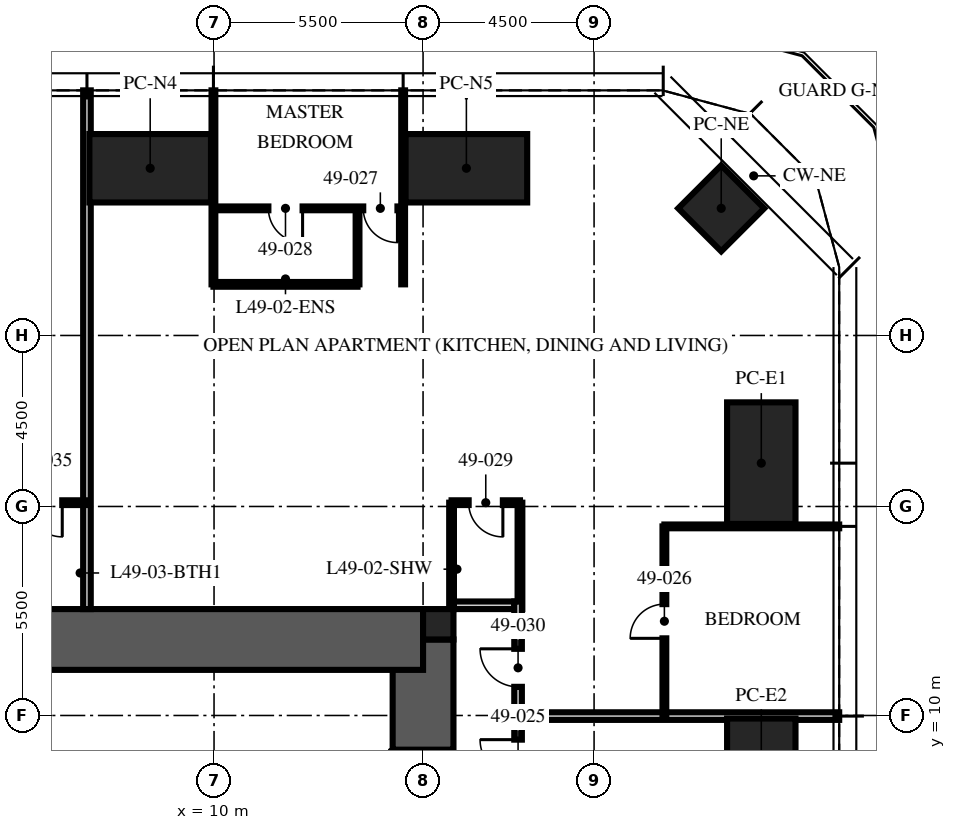
"""IFC4 building model, lengths in metres.
Left out: names, types, materials, properties, quantities, classifications, styles, units other than length and angle.
Written with IfcOpenShell. Run it as: python <this file> out.ifc"""

import sys

from ifc_helpers import new_model, si_unit, direction, frame, frame_2d, origin, origin_2d, place, context, subcontext, project, spatial, rectangle, hollow_rectangle, extrude, element, fill, save


model = new_model("IFC4")
c1 = context("Model", 3, precision=1e-05, world=origin(), true_north=direction((0.0, 1.0)))
c2 = subcontext(c1, "Body", "Model", "MODEL_VIEW")
j1 = project(units=[si_unit("LENGTHUNIT", "METRE"), si_unit("PLANEANGLEUNIT", "RADIAN")], contexts=[c1])
p1 = place(None, origin())
s1 = spatial("IfcSite", under=j1, at=p1, CompositionType="ELEMENT")
p2 = place(p1, origin())
s2 = spatial("IfcBuilding", under=s1, at=p2, CompositionType="ELEMENT")
p3 = place(p2, frame((0.0, 0.0, 199.5)))
s3 = spatial("IfcBuildingStorey", under=s2, at=p3, CompositionType="ELEMENT", Elevation=199.5)
p4 = place(p3, frame((15.5, -12.0, -0.25), z_axis=(0.0, 0.0, 1.0), x_axis=(0.0, 1.0, 0.0)))
e1 = element("IfcWall", 1, at=p4, inside=s3, PredefinedType="SHEAR", context=c2, shape_type="SweptSolid", body=[
    extrude(rectangle(XDim=24.0, YDim=1.6, at=frame_2d((12.0, 0.0))), origin(), (0.0, 0.0, 1.0), 3.75),
])
p5 = place(p4, frame((3.2, 0.0, 0.25)))
e2 = element("IfcOpeningElement", 2, at=p5, cuts=e1, PredefinedType="OPENING", context=c2, shape_type="SweptSolid", body=[
    extrude(rectangle(XDim=1.2, YDim=2.1, at=frame_2d((0.6, 1.05))), frame((0.0, 0.81, 0.0), z_axis=(0.0, -1.0, 0.0), x_axis=(1.0, 0.0, 0.0)), (0.0, 0.0, 1.0), 1.62),
])
p6 = place(p4, frame((19.3, 0.0, 0.25)))
e3 = element("IfcOpeningElement", 3, at=p6, cuts=e1, PredefinedType="OPENING", context=c2, shape_type="SweptSolid", body=[
    extrude(rectangle(XDim=1.8, YDim=2.1, at=frame_2d((0.9, 1.05))), frame((0.0, 0.81, 0.0), z_axis=(0.0, -1.0, 0.0), x_axis=(1.0, 0.0, 0.0)), (0.0, 0.0, 1.0), 1.62),
])
p7 = place(p3, frame((-15.5, 12.0, -0.25), z_axis=(0.0, 0.0, 1.0), x_axis=(1.0, 0.0, 0.0)))
e4 = element("IfcWall", 4, at=p7, inside=s3, PredefinedType="SHEAR", context=c2, shape_type="SweptSolid", body=[
    extrude(rectangle(XDim=31.0, YDim=1.6, at=frame_2d((15.5, 0.0))), origin(), (0.0, 0.0, 1.0), 3.75),
])
p8 = place(p3, frame((15.9, 12.4, -0.25), z_axis=(0.0, 0.0, 1.0), x_axis=(1.0, 0.0, 0.0)))
e5 = element("IfcColumn", 5, at=p8, inside=s3, PredefinedType="COLUMN", context=c2, shape_type="SweptSolid", body=[
    extrude(rectangle(XDim=0.8, YDim=0.8, at=origin_2d()), origin(), (0.0, 0.0, 1.0), 3.75),
])
p9 = place(p3, frame((8.32, 24.4, -0.07), z_axis=(0.0, 0.0, 1.0), x_axis=(1.0, 0.0, 0.0)))
e6 = element("IfcColumn", 6, at=p9, inside=s3, PredefinedType="COLUMN", context=c2, shape_type="SweptSolid", body=[
    extrude(hollow_rectangle(XDim=3.2, YDim=1.8, WallThickness=0.2, at=origin_2d()), origin(), (0.0, 0.0, 1.0), 3.82),
])
for number, where, z_axis, x_axis in (
    (7, (16.64, 24.4, 0.08), (0.0, 0.0, 1.0), (1.0, 0.0, 0.0)),
    (8, (24.4, 16.64, 0.08), (0.0, 0.0, 1.0), (0.0, 1.0, 0.0)),
):
    element("IfcColumn", number, at=place(p3, frame(where, z_axis=z_axis, x_axis=x_axis)), inside=s3, PredefinedType="COLUMN", context=c2, shape_type="SweptSolid", body=[
        extrude(hollow_rectangle(XDim=3.2, YDim=1.8, WallThickness=0.2, at=origin_2d()), origin(), (0.0, 0.0, 1.0), 3.67),
    ])
p10 = place(p3, frame((24.4, 8.32, -0.07), z_axis=(0.0, 0.0, 1.0), x_axis=(0.0, 1.0, 0.0)))
e9 = element("IfcColumn", 9, at=p10, inside=s3, PredefinedType="COLUMN", context=c2, shape_type="SweptSolid", body=[
    extrude(hollow_rectangle(XDim=3.2, YDim=1.8, WallThickness=0.2, at=origin_2d()), origin(), (0.0, 0.0, 1.0), 3.82),
])
p11 = place(p3, frame((23.346, 23.346, -0.19), z_axis=(0.0, 0.0, 1.0), x_axis=(0.707106781187, -0.707106781187, 0.0)))
e10 = element("IfcColumn", 10, at=p11, inside=s3, PredefinedType="COLUMN", context=c2, shape_type="SweptSolid", body=[
    extrude(hollow_rectangle(XDim=1.6, YDim=1.6, WallThickness=0.1, at=origin_2d()), origin(), (0.0, 0.0, 1.0), 3.94),
])
p12 = place(p3, frame((16.3, 12.9, 0.0), z_axis=(0.0, 0.0, 1.0), x_axis=(1.0, 0.0, 0.0)))
e11 = element("IfcWall", 11, at=p12, inside=s3, PredefinedType="PARTITIONING", context=c2, shape_type="SweptSolid", body=[
    extrude(rectangle(XDim=1.6, YDim=0.2, at=frame_2d((0.8, 0.0))), origin(), (0.0, 0.0, 1.0), 2.3),
])
p13 = place(p3, frame((18.1, 9.984, 0.0), z_axis=(0.0, 0.0, 1.0), x_axis=(1.0, 0.0, 0.0)))
e12 = element("IfcWall", 12, at=p13, inside=s3, PredefinedType="PARTITIONING", context=c2, shape_type="SweptSolid", body=[
    extrude(rectangle(XDim=8.35, YDim=0.2, at=frame_2d((4.175, 0.0))), origin(), (0.0, 0.0, 1.0), 2.91),
])
p14 = place(p3, frame((21.85, 14.976, 0.0), z_axis=(0.0, 0.0, 1.0), x_axis=(1.0, 0.0, 0.0)))
e13 = element("IfcWall", 13, at=p14, inside=s3, PredefinedType="PARTITIONING", context=c2, shape_type="SweptSolid", body=[
    extrude(rectangle(XDim=4.6, YDim=0.1, at=frame_2d((2.3, 0.0))), origin(), (0.0, 0.0, 1.0), 2.91),
])
for number, where, z_axis, x_axis in (
    (14, (14.976, 21.345, 0.0), (0.0, 0.0, 1.0), (0.0, 1.0, 0.0)),
    (15, (9.984, 21.345, 0.0), (0.0, 0.0, 1.0), (0.0, 1.0, 0.0)),
):
    element("IfcWall", number, at=place(p3, frame(where, z_axis=z_axis, x_axis=x_axis)), inside=s3, PredefinedType="PARTITIONING", context=c2, shape_type="SweptSolid", body=[
        extrude(rectangle(XDim=5.105, YDim=0.1, at=frame_2d((2.552, 0.0))), origin(), (0.0, 0.0, 1.0), 2.91),
    ])
p15 = place(p3, frame((6.656, 12.8, 0.0), z_axis=(0.0, 0.0, 1.0), x_axis=(0.0, 1.0, 0.0)))
e16 = element("IfcWall", 16, at=p15, inside=s3, PredefinedType="PARTITIONING", context=c2, shape_type="SweptSolid", body=[
    extrude(rectangle(XDim=13.65, YDim=0.2, at=frame_2d((6.825, 0.0))), origin(), (0.0, 0.0, 1.0), 2.91),
])
p16 = place(p3, frame((21.85, 9.984, 0.0), z_axis=(0.0, 0.0, 1.0), x_axis=(0.0, 1.0, 0.0)))
e17 = element("IfcWall", 17, at=p16, inside=s3, PredefinedType="PARTITIONING", context=c2, shape_type="SweptSolid", body=[
    extrude(rectangle(XDim=4.992, YDim=0.1, at=frame_2d((2.496, 0.0))), origin(), (0.0, 0.0, 1.0), 2.81),
])
p17 = place(p16, frame((2.046, 0.0, 0.0)))
e18 = element("IfcOpeningElement", 18, at=p17, cuts=e17, PredefinedType="OPENING", context=c2, shape_type="SweptSolid", body=[
    extrude(rectangle(XDim=0.9, YDim=2.1, at=frame_2d((0.45, 1.05))), frame((0.0, 0.06, 0.0), z_axis=(0.0, -1.0, 0.0), x_axis=(1.0, 0.0, 0.0)), (0.0, 0.0, 1.0), 0.12),
])
p18 = place(p3, frame((14.976, 23.345, 0.0), z_axis=(0.0, 0.0, 1.0), x_axis=(-1.0, 0.0, 0.0)))
e19 = element("IfcWall", 19, at=p18, inside=s3, PredefinedType="PARTITIONING", context=c2, shape_type="SweptSolid", body=[
    extrude(rectangle(XDim=4.992, YDim=0.1, at=frame_2d((2.496, 0.0))), origin(), (0.0, 0.0, 1.0), 2.81),
])
p19 = place(p18, frame((0.15, 0.0, 0.0)))
e20 = element("IfcOpeningElement", 20, at=p19, cuts=e19, PredefinedType="OPENING", context=c2, shape_type="SweptSolid", body=[
    extrude(rectangle(XDim=0.9, YDim=2.1, at=frame_2d((0.45, 1.05))), frame((0.0, 0.06, 0.0), z_axis=(0.0, -1.0, 0.0), x_axis=(1.0, 0.0, 0.0)), (0.0, 0.0, 1.0), 0.12),
])
p20 = place(p18, frame((2.646, 0.0, 0.0)))
e21 = element("IfcOpeningElement", 21, at=p20, cuts=e19, PredefinedType="OPENING", context=c2, shape_type="SweptSolid", body=[
    extrude(rectangle(XDim=0.9, YDim=2.1, at=frame_2d((0.45, 1.05))), frame((0.0, 0.06, 0.0), z_axis=(0.0, -1.0, 0.0), x_axis=(1.0, 0.0, 0.0)), (0.0, 0.0, 1.0), 0.12),
])
p21 = place(p3, frame((13.776, 21.345, 0.0), z_axis=(0.0, 0.0, 1.0), x_axis=(0.0, 1.0, 0.0)))
e22 = element("IfcWall", 22, at=p21, inside=s3, PredefinedType="PARTITIONING", context=c2, shape_type="SweptSolid", body=[
    extrude(rectangle(XDim=2.0, YDim=0.1, at=frame_2d((1.0, 0.0))), origin(), (0.0, 0.0, 1.0), 3.5),
])
p22 = place(p3, frame((13.776, 21.345, 0.0), z_axis=(0.0, 0.0, 1.0), x_axis=(-1.0, 0.0, 0.0)))
e23 = element("IfcWall", 23, at=p22, inside=s3, PredefinedType="PARTITIONING", context=c2, shape_type="SweptSolid", body=[
    extrude(rectangle(XDim=3.792, YDim=0.125, at=frame_2d((1.896, 0.0))), origin(), (0.0, 0.0, 1.0), 2.81),
])
p23 = place(p3, frame((18.05, 15.6, 0.0), z_axis=(0.0, 0.0, 1.0), x_axis=(-1.0, 0.0, 0.0)))
e24 = element("IfcWall", 24, at=p23, inside=s3, PredefinedType="PARTITIONING", context=c2, shape_type="SweptSolid", body=[
    extrude(rectangle(XDim=1.8, YDim=0.125, at=frame_2d((0.9, 0.0))), origin(), (0.0, 0.0, 1.0), 2.3),
])
p24 = place(p23, frame((0.45, 0.0, 0.0)))
e25 = element("IfcOpeningElement", 25, at=p24, cuts=e24, PredefinedType="OPENING", context=c2, shape_type="SweptSolid", body=[
    extrude(rectangle(XDim=0.9, YDim=2.1, at=frame_2d((0.45, 1.05))), frame((0.0, 0.073, 0.0), z_axis=(0.0, -1.0, 0.0), x_axis=(1.0, 0.0, 0.0)), (0.0, 0.0, 1.0), 0.145),
])
for number, where, z_axis, x_axis in (
    (26, (18.05, 12.8, 0.0), (0.0, 0.0, 1.0), (0.0, 1.0, 0.0)),
    (27, (16.25, 12.8, 0.0), (0.0, 0.0, 1.0), (0.0, 1.0, 0.0)),
):
    element("IfcWall", number, at=place(p3, frame(where, z_axis=z_axis, x_axis=x_axis)), inside=s3, PredefinedType="PARTITIONING", context=c2, shape_type="SweptSolid", body=[
        extrude(rectangle(XDim=2.8, YDim=0.125, at=frame_2d((1.4, 0.0))), origin(), (0.0, 0.0, 1.0), 2.3),
    ])
p25 = place(p3, frame((6.656, 15.6, 0.0), z_axis=(0.0, 0.0, 1.0), x_axis=(-1.0, 0.0, 0.0)))
e28 = element("IfcWall", 28, at=p25, inside=s3, PredefinedType="PARTITIONING", context=c2, shape_type="SweptSolid", body=[
    extrude(rectangle(XDim=2.2, YDim=0.125, at=frame_2d((1.1, 0.0))), origin(), (0.0, 0.0, 1.0), 3.5),
])
p26 = place(p25, frame((0.65, 0.0, 0.0)))
e29 = element("IfcOpeningElement", 29, at=p26, cuts=e28, PredefinedType="OPENING", context=c2, shape_type="SweptSolid", body=[
    extrude(rectangle(XDim=0.9, YDim=2.1, at=frame_2d((0.45, 1.05))), frame((0.0, 0.073, 0.0), z_axis=(0.0, -1.0, 0.0), x_axis=(1.0, 0.0, 0.0)), (0.0, 0.0, 1.0), 0.145),
])
p27 = place(p3, frame((18.0, -13.0, 0.0), z_axis=(0.0, 0.0, 1.0), x_axis=(0.0, 1.0, 0.0)))
e30 = element("IfcWall", 30, at=p27, inside=s3, PredefinedType="PARTITIONING", context=c2, shape_type="SweptSolid", body=[
    extrude(rectangle(XDim=26.0, YDim=0.2, at=frame_2d((13.0, 0.0))), origin(), (0.0, 0.0, 1.0), 2.6),
])
p28 = place(p27, frame((21.364, 0.0, 0.0)))
e31 = element("IfcOpeningElement", 31, at=p28, cuts=e30, PredefinedType="OPENING", context=c2, shape_type="SweptSolid", body=[
    extrude(rectangle(XDim=1.0, YDim=2.2, at=frame_2d((0.5, 1.1))), frame((0.0, 0.11, 0.0), z_axis=(0.0, -1.0, 0.0), x_axis=(1.0, 0.0, 0.0)), (0.0, 0.0, 1.0), 0.22),
])
p29 = place(p27, frame((23.754, 0.0, 0.0)))
e32 = element("IfcOpeningElement", 32, at=p29, cuts=e30, PredefinedType="OPENING", context=c2, shape_type="SweptSolid", body=[
    extrude(rectangle(XDim=1.0, YDim=2.2, at=frame_2d((0.5, 1.1))), frame((0.0, 0.11, 0.0), z_axis=(0.0, -1.0, 0.0), x_axis=(1.0, 0.0, 0.0)), (0.0, 0.0, 1.0), 0.22),
])
p30 = place(p27, frame((4.6, 0.0, 0.0)))
e33 = element("IfcOpeningElement", 33, at=p30, cuts=e30, PredefinedType="OPENING", context=c2, shape_type="SweptSolid", body=[
    extrude(rectangle(XDim=1.0, YDim=2.2, at=frame_2d((0.5, 1.1))), frame((0.0, 0.11, 0.0), z_axis=(0.0, -1.0, 0.0), x_axis=(1.0, 0.0, 0.0)), (0.0, 0.0, 1.0), 0.22),
])
p31 = place(p6, origin())
e34 = element("IfcDoor", 34, at=p31, inside=s3, OperationType="DOUBLE_DOOR_SINGLE_SWING", PredefinedType="DOOR", context=c2, shape_type="SweptSolid", body=[
    extrude(rectangle(XDim=1.8, YDim=2.1, at=frame_2d((0.9, 1.05))), frame((0.0, 0.025, 0.0), z_axis=(0.0, -1.0, 0.0), x_axis=(1.0, 0.0, 0.0)), (0.0, 0.0, 1.0), 0.05),
])
fill(e3, e34)
p32 = place(p28, origin())
e35 = element("IfcDoor", 35, at=p32, inside=s3, OperationType="SINGLE_SWING_RIGHT", PredefinedType="DOOR", context=c2, shape_type="SweptSolid", body=[
    extrude(rectangle(XDim=1.0, YDim=2.2, at=frame_2d((0.5, 1.1))), frame((0.0, 0.025, 0.0), z_axis=(0.0, -1.0, 0.0), x_axis=(1.0, 0.0, 0.0)), (0.0, 0.0, 1.0), 0.05),
])
fill(e31, e35)
p33 = place(p17, origin())
e36 = element("IfcDoor", 36, at=p33, inside=s3, OperationType="SINGLE_SWING_LEFT", PredefinedType="DOOR", context=c2, shape_type="SweptSolid", body=[
    extrude(rectangle(XDim=0.9, YDim=2.1, at=frame_2d((0.45, 1.05))), frame((0.0, 0.025, 0.0), z_axis=(0.0, -1.0, 0.0), x_axis=(1.0, 0.0, 0.0)), (0.0, 0.0, 1.0), 0.05),
])
fill(e18, e36)
p34 = place(p19, origin())
e37 = element("IfcDoor", 37, at=p34, inside=s3, OperationType="SINGLE_SWING_LEFT", PredefinedType="DOOR", context=c2, shape_type="SweptSolid", body=[
    extrude(rectangle(XDim=0.9, YDim=2.1, at=frame_2d((0.45, 1.05))), frame((0.0, 0.025, 0.0), z_axis=(0.0, -1.0, 0.0), x_axis=(1.0, 0.0, 0.0)), (0.0, 0.0, 1.0), 0.05),
])
fill(e20, e37)
p35 = place(p20, origin())
e38 = element("IfcDoor", 38, at=p35, inside=s3, OperationType="SINGLE_SWING_LEFT", PredefinedType="DOOR", context=c2, shape_type="SweptSolid", body=[
    extrude(rectangle(XDim=0.9, YDim=2.1, at=frame_2d((0.45, 1.05))), frame((0.0, 0.025, 0.0), z_axis=(0.0, -1.0, 0.0), x_axis=(1.0, 0.0, 0.0)), (0.0, 0.0, 1.0), 0.05),
])
fill(e21, e38)
p36 = place(p24, origin())
e39 = element("IfcDoor", 39, at=p36, inside=s3, OperationType="SINGLE_SWING_LEFT", PredefinedType="DOOR", context=c2, shape_type="SweptSolid", body=[
    extrude(rectangle(XDim=0.9, YDim=2.1, at=frame_2d((0.45, 1.05))), frame((0.0, 0.025, 0.0), z_axis=(0.0, -1.0, 0.0), x_axis=(1.0, 0.0, 0.0)), (0.0, 0.0, 1.0), 0.05),
])
fill(e25, e39)
p37 = place(p29, origin())
e40 = element("IfcDoor", 40, at=p37, inside=s3, OperationType="SINGLE_SWING_RIGHT", PredefinedType="DOOR", context=c2, shape_type="SweptSolid", body=[
    extrude(rectangle(XDim=1.0, YDim=2.2, at=frame_2d((0.5, 1.1))), frame((0.0, 0.025, 0.0), z_axis=(0.0, -1.0, 0.0), x_axis=(1.0, 0.0, 0.0)), (0.0, 0.0, 1.0), 0.05),
])
fill(e32, e40)
p38 = place(p26, origin())
e41 = element("IfcDoor", 41, at=p38, inside=s3, OperationType="SINGLE_SWING_LEFT", PredefinedType="DOOR", context=c2, shape_type="SweptSolid", body=[
    extrude(rectangle(XDim=0.9, YDim=2.1, at=frame_2d((0.45, 1.05))), frame((0.0, 0.025, 0.0), z_axis=(0.0, -1.0, 0.0), x_axis=(1.0, 0.0, 0.0)), (0.0, 0.0, 1.0), 0.05),
])
fill(e29, e41)
save(model, sys.argv[1])
